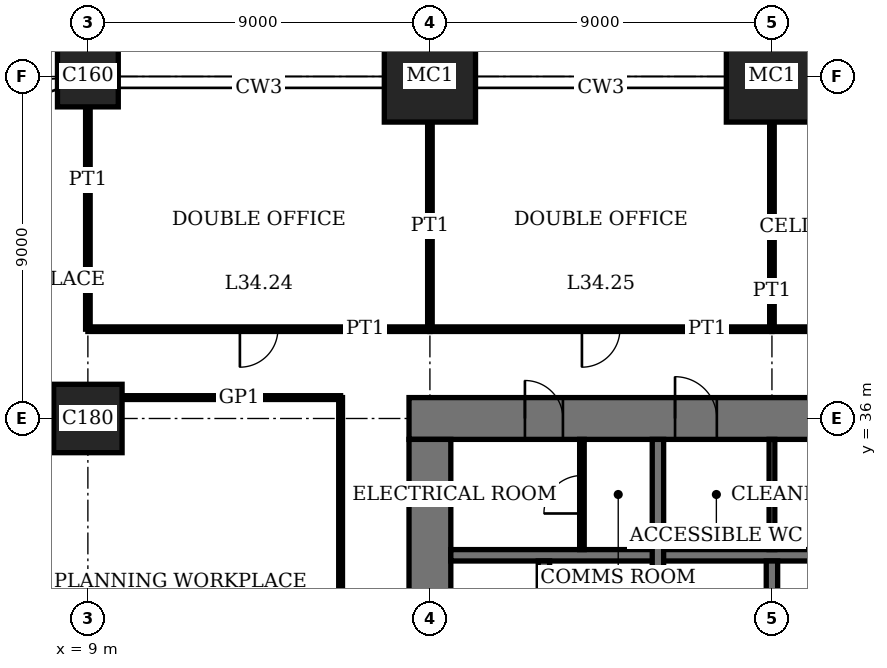
"""IFC4 building model, lengths in metres.
Left out: names, types, materials, properties, quantities, classifications, styles, units other than length and angle.
Written with IfcOpenShell. Run it as: python <this file> out.ifc"""

import sys

from ifc_helpers import new_model, si_unit, direction, frame, frame_2d, origin, origin_2d, place, context, subcontext, project, spatial, rectangle, extrude, element, fill, save


model = new_model("IFC4")
c1 = context("Model", 3, precision=1e-05, world=origin(), true_north=direction((0.0, 1.0)))
c2 = subcontext(c1, "Body", "Model", "MODEL_VIEW")
j1 = project(units=[si_unit("LENGTHUNIT", "METRE"), si_unit("PLANEANGLEUNIT", "RADIAN")], contexts=[c1])
p1 = place(None, origin())
s1 = spatial("IfcSite", under=j1, at=p1, CompositionType="ELEMENT")
p2 = place(p1, origin())
s2 = spatial("IfcBuilding", under=s1, at=p2, CompositionType="ELEMENT")
p3 = place(p2, frame((0.0, 0.0, 141.0)))
s3 = spatial("IfcBuildingStorey", under=s2, at=p3, CompositionType="ELEMENT", Elevation=141.0)
p4 = place(p3, frame((9.0, 36.0, 0.0), z_axis=(0.0, 0.0, 1.0), x_axis=(1.0, 0.0, 0.0)))
e1 = element("IfcColumn", 1, at=p4, inside=s3, PredefinedType="COLUMN", context=c2, shape_type="SweptSolid", body=[
    extrude(rectangle(XDim=1.8, YDim=1.8, at=origin_2d()), origin(), (0.0, 0.0, 1.0), 4.0),
])
p5 = place(p3, frame((9.0, 45.0, 0.0), z_axis=(0.0, 0.0, 1.0), x_axis=(1.0, 0.0, 0.0)))
e2 = element("IfcColumn", 2, at=p5, inside=s3, PredefinedType="COLUMN", context=c2, shape_type="SweptSolid", body=[
    extrude(rectangle(XDim=1.6, YDim=1.6, at=origin_2d()), origin(), (0.0, 0.0, 1.0), 4.0),
])
for number, where, z_axis, x_axis in (
    (3, (18.0, 45.0, 0.0), (0.0, 0.0, 1.0), (1.0, 0.0, 0.0)),
    (4, (27.0, 45.0, 0.0), (0.0, 0.0, 1.0), (1.0, 0.0, 0.0)),
):
    element("IfcColumn", number, at=place(p3, frame(where, z_axis=z_axis, x_axis=x_axis)), inside=s3, PredefinedType="COLUMN", context=c2, shape_type="SweptSolid", body=[
        extrude(rectangle(XDim=2.4, YDim=2.4, at=origin_2d()), origin(), (0.0, 0.0, 1.0), 4.0),
    ])
p6 = place(p3, frame((45.55, 36.0, 0.0), z_axis=(0.0, 0.0, 1.0), x_axis=(-1.0, 0.0, 0.0)))
e5 = element("IfcWall", 5, at=p6, inside=s3, PredefinedType="SHEAR", context=c2, shape_type="SweptSolid", body=[
    extrude(rectangle(XDim=28.1, YDim=1.1, at=frame_2d((14.05, 0.0))), origin(), (0.0, 0.0, 1.0), 4.0),
])
p7 = place(p6, frame((11.55, 0.0, 0.0)))
e6 = element("IfcOpeningElement", 6, at=p7, cuts=e5, PredefinedType="OPENING", context=c2, shape_type="SweptSolid", body=[
    extrude(rectangle(XDim=1.0, YDim=2.4, at=frame_2d((0.5, 1.2))), frame((0.0, 0.56, 0.0), z_axis=(0.0, -1.0, 0.0), x_axis=(1.0, 0.0, 0.0)), (0.0, 0.0, 1.0), 1.12),
])
p8 = place(p6, frame((16.55, 0.0, 0.0)))
e7 = element("IfcOpeningElement", 7, at=p8, cuts=e5, PredefinedType="OPENING", context=c2, shape_type="SweptSolid", body=[
    extrude(rectangle(XDim=1.0, YDim=2.4, at=frame_2d((0.5, 1.2))), frame((0.0, 0.56, 0.0), z_axis=(0.0, -1.0, 0.0), x_axis=(1.0, 0.0, 0.0)), (0.0, 0.0, 1.0), 1.12),
])
p9 = place(p6, frame((20.0, 0.0, 0.0)))
e8 = element("IfcOpeningElement", 8, at=p9, cuts=e5, PredefinedType="OPENING", context=c2, shape_type="SweptSolid", body=[
    extrude(rectangle(XDim=1.1, YDim=2.4, at=frame_2d((0.55, 1.2))), frame((0.0, 0.56, 0.0), z_axis=(0.0, -1.0, 0.0), x_axis=(1.0, 0.0, 0.0)), (0.0, 0.0, 1.0), 1.12),
])
p10 = place(p6, frame((24.05, 0.0, 0.0)))
e9 = element("IfcOpeningElement", 9, at=p10, cuts=e5, PredefinedType="OPENING", context=c2, shape_type="SweptSolid", body=[
    extrude(rectangle(XDim=1.0, YDim=2.4, at=frame_2d((0.5, 1.2))), frame((0.0, 0.56, 0.0), z_axis=(0.0, -1.0, 0.0), x_axis=(1.0, 0.0, 0.0)), (0.0, 0.0, 1.0), 1.12),
])
p11 = place(p3, frame((18.0, 35.45, 0.0), z_axis=(0.0, 0.0, 1.0), x_axis=(0.0, -1.0, 0.0)))
e10 = element("IfcWall", 10, at=p11, inside=s3, PredefinedType="SHEAR", context=c2, shape_type="SweptSolid", body=[
    extrude(rectangle(XDim=16.9, YDim=1.1, at=frame_2d((8.45, 0.0))), origin(), (0.0, 0.0, 1.0), 4.0),
])
p12 = place(p11, frame((8.45, 0.0, 0.0)))
e11 = element("IfcOpeningElement", 11, at=p12, cuts=e10, PredefinedType="OPENING", context=c2, shape_type="SweptSolid", body=[
    extrude(rectangle(XDim=1.8, YDim=2.4, at=frame_2d((0.9, 1.2))), frame((0.0, 0.56, 0.0), z_axis=(0.0, -1.0, 0.0), x_axis=(1.0, 0.0, 0.0)), (0.0, 0.0, 1.0), 1.12),
])
p13 = place(p3, frame((18.55, 32.4, 0.0), z_axis=(0.0, 0.0, 1.0), x_axis=(1.0, 0.0, 0.0)))
e12 = element("IfcWall", 12, at=p13, inside=s3, PredefinedType="SHEAR", context=c2, shape_type="SweptSolid", body=[
    extrude(rectangle(XDim=17.3, YDim=0.3, at=frame_2d((8.65, 0.0))), origin(), (0.0, 0.0, 1.0), 4.0),
])
p14 = place(p3, frame((27.0, 29.55, 0.0), z_axis=(0.0, 0.0, 1.0), x_axis=(0.0, 1.0, 0.0)))
e13 = element("IfcWall", 13, at=p14, inside=s3, PredefinedType="SHEAR", context=c2, shape_type="SweptSolid", body=[
    extrude(rectangle(XDim=2.7, YDim=0.3, at=frame_2d((1.35, 0.0))), origin(), (0.0, 0.0, 1.0), 4.0),
])
p15 = place(p3, frame((24.0, 29.55, 0.0), z_axis=(0.0, 0.0, 1.0), x_axis=(0.0, 1.0, 0.0)))
e14 = element("IfcWall", 14, at=p15, inside=s3, PredefinedType="SHEAR", context=c2, shape_type="SweptSolid", body=[
    extrude(rectangle(XDim=5.9, YDim=0.3, at=frame_2d((2.95, 0.0))), origin(), (0.0, 0.0, 1.0), 4.0),
])
p16 = place(p3, frame((21.0, 29.55, 0.0), z_axis=(0.0, 0.0, 1.0), x_axis=(0.0, 1.0, 0.0)))
e15 = element("IfcWall", 15, at=p16, inside=s3, PredefinedType="SHEAR", context=c2, shape_type="SweptSolid", body=[
    extrude(rectangle(XDim=2.7, YDim=0.3, at=frame_2d((1.35, 0.0))), origin(), (0.0, 0.0, 1.0), 4.0),
])
p17 = place(p3, frame((1.2, 36.55, 0.0), z_axis=(0.0, 0.0, 1.0), x_axis=(1.0, 0.0, 0.0)))
e16 = element("IfcWall", 16, at=p17, inside=s3, PredefinedType="PARTITIONING", context=c2, shape_type="SweptSolid", body=[
    extrude(rectangle(XDim=6.9, YDim=0.1, at=frame_2d((3.45, 0.0))), origin(), (0.0, 0.0, 1.0), 3.05),
])
p18 = place(p3, frame((9.9, 36.55, 0.0), z_axis=(0.0, 0.0, 1.0), x_axis=(1.0, 0.0, 0.0)))
e17 = element("IfcWall", 17, at=p18, inside=s3, PredefinedType="PARTITIONING", context=c2, shape_type="SweptSolid", body=[
    extrude(rectangle(XDim=5.75, YDim=0.1, at=frame_2d((2.875, 0.0))), origin(), (0.0, 0.0, 1.0), 3.05),
])
p19 = place(p3, frame((9.0, 38.35, 0.0), z_axis=(0.0, 0.0, 1.0), x_axis=(1.0, 0.0, 0.0)))
e18 = element("IfcWall", 18, at=p19, inside=s3, PredefinedType="PARTITIONING", context=c2, shape_type="SweptSolid", body=[
    extrude(rectangle(XDim=9.0, YDim=0.12, at=frame_2d((4.5, 0.0))), origin(), (0.0, 0.0, 1.0), 3.75),
])
p20 = place(p19, frame((4.0, 0.0, 0.0)))
e19 = element("IfcOpeningElement", 19, at=p20, cuts=e18, PredefinedType="OPENING", context=c2, shape_type="SweptSolid", body=[
    extrude(rectangle(XDim=1.0, YDim=2.4, at=frame_2d((0.5, 1.2))), frame((0.0, 0.07, 0.0), z_axis=(0.0, -1.0, 0.0), x_axis=(1.0, 0.0, 0.0)), (0.0, 0.0, 1.0), 0.14),
])
p21 = place(p3, frame((18.0, 38.35, 0.0), z_axis=(0.0, 0.0, 1.0), x_axis=(1.0, 0.0, 0.0)))
e20 = element("IfcWall", 20, at=p21, inside=s3, PredefinedType="PARTITIONING", context=c2, shape_type="SweptSolid", body=[
    extrude(rectangle(XDim=9.0, YDim=0.12, at=frame_2d((4.5, 0.0))), origin(), (0.0, 0.0, 1.0), 3.75),
])
p22 = place(p21, frame((4.0, 0.0, 0.0)))
e21 = element("IfcOpeningElement", 21, at=p22, cuts=e20, PredefinedType="OPENING", context=c2, shape_type="SweptSolid", body=[
    extrude(rectangle(XDim=1.0, YDim=2.4, at=frame_2d((0.5, 1.2))), frame((0.0, 0.07, 0.0), z_axis=(0.0, -1.0, 0.0), x_axis=(1.0, 0.0, 0.0)), (0.0, 0.0, 1.0), 0.14),
])
p23 = place(p3, frame((27.0, 38.35, 0.0), z_axis=(0.0, 0.0, 1.0), x_axis=(1.0, 0.0, 0.0)))
e22 = element("IfcWall", 22, at=p23, inside=s3, PredefinedType="PARTITIONING", context=c2, shape_type="SweptSolid", body=[
    extrude(rectangle(XDim=4.5, YDim=0.12, at=frame_2d((2.25, 0.0))), origin(), (0.0, 0.0, 1.0), 3.75),
])
p24 = place(p23, frame((1.75, 0.0, 0.0)))
e23 = element("IfcOpeningElement", 23, at=p24, cuts=e22, PredefinedType="OPENING", context=c2, shape_type="SweptSolid", body=[
    extrude(rectangle(XDim=1.0, YDim=2.4, at=frame_2d((0.5, 1.2))), frame((0.0, 0.07, 0.0), z_axis=(0.0, -1.0, 0.0), x_axis=(1.0, 0.0, 0.0)), (0.0, 0.0, 1.0), 0.14),
])
p25 = place(p3, frame((9.0, 38.35, 0.0), z_axis=(0.0, 0.0, 1.0), x_axis=(0.0, 1.0, 0.0)))
e24 = element("IfcWall", 24, at=p25, inside=s3, PredefinedType="PARTITIONING", context=c2, shape_type="SweptSolid", body=[
    extrude(rectangle(XDim=5.85, YDim=0.12, at=frame_2d((2.925, 0.0))), origin(), (0.0, 0.0, 1.0), 3.05),
])
p26 = place(p3, frame((15.65, 27.0, 0.0), z_axis=(0.0, 0.0, 1.0), x_axis=(0.0, 1.0, 0.0)))
e25 = element("IfcWall", 25, at=p26, inside=s3, PredefinedType="PARTITIONING", context=c2, shape_type="SweptSolid", body=[
    extrude(rectangle(XDim=9.55, YDim=0.1, at=frame_2d((4.775, 0.0))), origin(), (0.0, 0.0, 1.0), 3.75),
])
for number, where, z_axis, x_axis in (
    (26, (18.0, 38.35, 0.0), (0.0, 0.0, 1.0), (0.0, 1.0, 0.0)),
    (27, (27.0, 38.35, 0.0), (0.0, 0.0, 1.0), (0.0, 1.0, 0.0)),
):
    element("IfcWall", number, at=place(p3, frame(where, z_axis=z_axis, x_axis=x_axis)), inside=s3, PredefinedType="PARTITIONING", context=c2, shape_type="SweptSolid", body=[
        extrude(rectangle(XDim=5.45, YDim=0.12, at=frame_2d((2.725, 0.0))), origin(), (0.0, 0.0, 1.0), 3.05),
    ])
p27 = place(p3, frame((27.0, 32.55, 0.0), z_axis=(0.0, 0.0, 1.0), x_axis=(0.0, 1.0, 0.0)))
e28 = element("IfcWall", 28, at=p27, inside=s3, PredefinedType="PARTITIONING", context=c2, shape_type="SweptSolid", body=[
    extrude(rectangle(XDim=2.9, YDim=0.15, at=frame_2d((1.45, 0.0))), origin(), (0.0, 0.0, 1.0), 3.75),
])
p28 = place(p3, frame((22.0, 32.55, 0.0), z_axis=(0.0, 0.0, 1.0), x_axis=(0.0, 1.0, 0.0)))
e29 = element("IfcWall", 29, at=p28, inside=s3, PredefinedType="PARTITIONING", context=c2, shape_type="SweptSolid", body=[
    extrude(rectangle(XDim=2.9, YDim=0.12, at=frame_2d((1.45, 0.0))), origin(), (0.0, 0.0, 1.0), 3.75),
])
p29 = place(p28, frame((0.95, 0.0, 0.0)))
e30 = element("IfcOpeningElement", 30, at=p29, cuts=e29, PredefinedType="OPENING", context=c2, shape_type="SweptSolid", body=[
    extrude(rectangle(XDim=1.0, YDim=2.4, at=frame_2d((0.5, 1.2))), frame((0.0, 0.07, 0.0), z_axis=(0.0, -1.0, 0.0), x_axis=(1.0, 0.0, 0.0)), (0.0, 0.0, 1.0), 0.14),
])
p30 = place(p9, origin())
e31 = element("IfcDoor", 31, at=p30, inside=s3, OperationType="SINGLE_SWING_RIGHT", PredefinedType="DOOR", context=c2, shape_type="SweptSolid", body=[
    extrude(rectangle(XDim=1.1, YDim=2.4, at=frame_2d((0.55, 1.2))), frame((0.0, 0.025, 0.0), z_axis=(0.0, -1.0, 0.0), x_axis=(1.0, 0.0, 0.0)), (0.0, 0.0, 1.0), 0.05),
    extrude(rectangle(XDim=0.04, YDim=2.4, at=frame_2d((0.02, 1.2))), frame((0.0, 0.44, 0.0), z_axis=(0.0, -1.0, 0.0), x_axis=(1.0, 0.0, 0.0)), (0.0, 0.0, 1.0), 0.88),
    extrude(rectangle(XDim=0.04, YDim=2.4, at=frame_2d((1.08, 1.2))), frame((0.0, 0.44, 0.0), z_axis=(0.0, -1.0, 0.0), x_axis=(1.0, 0.0, 0.0)), (0.0, 0.0, 1.0), 0.88),
    extrude(rectangle(XDim=1.1, YDim=0.04, at=frame_2d((0.55, 2.38))), frame((0.0, 0.44, 0.0), z_axis=(0.0, -1.0, 0.0), x_axis=(1.0, 0.0, 0.0)), (0.0, 0.0, 1.0), 0.88),
])
fill(e8, e31)
p31 = place(p10, origin())
e32 = element("IfcDoor", 32, at=p31, inside=s3, OperationType="SINGLE_SWING_RIGHT", PredefinedType="DOOR", context=c2, shape_type="SweptSolid", body=[
    extrude(rectangle(XDim=1.0, YDim=2.4, at=frame_2d((0.5, 1.2))), frame((0.0, 0.025, 0.0), z_axis=(0.0, -1.0, 0.0), x_axis=(1.0, 0.0, 0.0)), (0.0, 0.0, 1.0), 0.05),
    extrude(rectangle(XDim=0.04, YDim=2.4, at=frame_2d((0.02, 1.2))), frame((0.0, 0.4, 0.0), z_axis=(0.0, -1.0, 0.0), x_axis=(1.0, 0.0, 0.0)), (0.0, 0.0, 1.0), 0.8),
    extrude(rectangle(XDim=0.04, YDim=2.4, at=frame_2d((0.98, 1.2))), frame((0.0, 0.4, 0.0), z_axis=(0.0, -1.0, 0.0), x_axis=(1.0, 0.0, 0.0)), (0.0, 0.0, 1.0), 0.8),
    extrude(rectangle(XDim=1.0, YDim=0.04, at=frame_2d((0.5, 2.38))), frame((0.0, 0.4, 0.0), z_axis=(0.0, -1.0, 0.0), x_axis=(1.0, 0.0, 0.0)), (0.0, 0.0, 1.0), 0.8),
])
fill(e9, e32)
p32 = place(p20, origin())
e33 = element("IfcDoor", 33, at=p32, inside=s3, OperationType="SINGLE_SWING_LEFT", PredefinedType="DOOR", context=c2, shape_type="SweptSolid", body=[
    extrude(rectangle(XDim=1.0, YDim=2.4, at=frame_2d((0.5, 1.2))), frame((0.0, 0.025, 0.0), z_axis=(0.0, -1.0, 0.0), x_axis=(1.0, 0.0, 0.0)), (0.0, 0.0, 1.0), 0.05),
])
fill(e19, e33)
p33 = place(p22, origin())
e34 = element("IfcDoor", 34, at=p33, inside=s3, OperationType="SINGLE_SWING_LEFT", PredefinedType="DOOR", context=c2, shape_type="SweptSolid", body=[
    extrude(rectangle(XDim=1.0, YDim=2.4, at=frame_2d((0.5, 1.2))), frame((0.0, 0.025, 0.0), z_axis=(0.0, -1.0, 0.0), x_axis=(1.0, 0.0, 0.0)), (0.0, 0.0, 1.0), 0.05),
])
fill(e21, e34)
p34 = place(p29, origin())
e35 = element("IfcDoor", 35, at=p34, inside=s3, OperationType="SINGLE_SWING_RIGHT", PredefinedType="DOOR", context=c2, shape_type="SweptSolid", body=[
    extrude(rectangle(XDim=1.0, YDim=2.4, at=frame_2d((0.5, 1.2))), frame((0.0, 0.03, 0.0), z_axis=(0.0, -1.0, 0.0), x_axis=(1.0, 0.0, 0.0)), (0.0, 0.0, 1.0), 0.06),
])
fill(e30, e35)
save(model, sys.argv[1])
